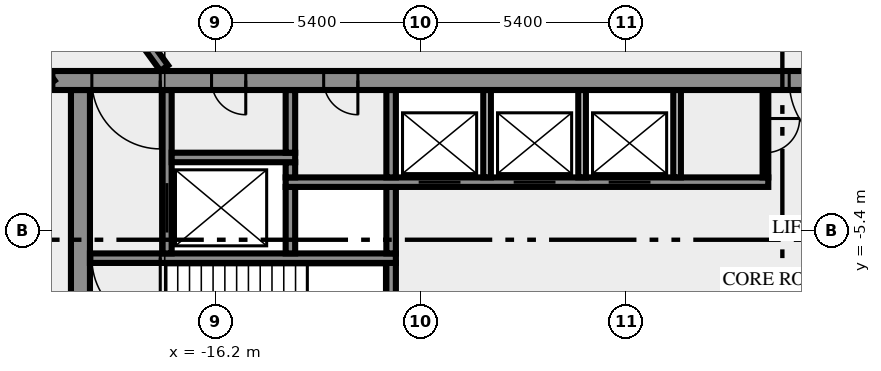
"""IFC4 building model, lengths in metres.
Left out: names, types, materials, properties, quantities, classifications, styles, units other than length and angle.
Written with IfcOpenShell. Run it as: python <this file> out.ifc"""

import sys

from ifc_helpers import new_model, si_unit, direction, frame, frame_2d, origin, place, context, subcontext, project, spatial, rectangle, extrude, element, fill, save


model = new_model("IFC4")
c1 = context("Model", 3, precision=1e-05, world=origin(), true_north=direction((0.0, 1.0)))
c2 = subcontext(c1, "Body", "Model", "MODEL_VIEW")
j1 = project(units=[si_unit("LENGTHUNIT", "METRE"), si_unit("PLANEANGLEUNIT", "RADIAN")], contexts=[c1])
p1 = place(None, origin())
s1 = spatial("IfcSite", under=j1, at=p1, CompositionType="ELEMENT")
p2 = place(p1, origin())
s2 = spatial("IfcBuilding", under=s1, at=p2, CompositionType="ELEMENT")
p3 = place(p2, frame((0.0, 0.0, 59.0)))
s3 = spatial("IfcBuildingStorey", under=s2, at=p3, CompositionType="ELEMENT", Elevation=59.0)
p4 = place(p3, frame((-19.75, -10.5, 0.0), z_axis=(0.0, 0.0, 1.0), x_axis=(0.0, 1.0, 0.0)))
e1 = element("IfcWall", 1, at=p4, inside=s3, PredefinedType="SHEAR", context=c2, shape_type="SweptSolid", body=[
    extrude(rectangle(XDim=8.8, YDim=0.5, at=frame_2d((4.4, 0.0))), origin(), (0.0, 0.0, 1.0), 3.65),
])
p5 = place(p3, frame((-11.575, -7.25, 0.0), z_axis=(0.0, 0.0, 1.0), x_axis=(0.0, 1.0, 0.0)))
e2 = element("IfcWall", 2, at=p5, inside=s3, PredefinedType="SHEAR", context=c2, shape_type="SweptSolid", body=[
    extrude(rectangle(XDim=1.0, YDim=0.25, at=frame_2d((0.5, 0.0))), origin(), (0.0, 0.0, 1.0), 3.65),
])
p6 = place(p3, frame((-11.45, -6.125, 0.0), z_axis=(0.0, 0.0, 1.0), x_axis=(-1.0, 0.0, 0.0)))
e3 = element("IfcWall", 3, at=p6, inside=s3, PredefinedType="SHEAR", context=c2, shape_type="SweptSolid", body=[
    extrude(rectangle(XDim=8.05, YDim=0.25, at=frame_2d((4.025, 0.0))), origin(), (0.0, 0.0, 1.0), 3.65),
])
p7 = place(p6, frame((6.2, 0.0, 0.0)))
e4 = element("IfcOpeningElement", 4, at=p7, cuts=e3, PredefinedType="OPENING", context=c2, shape_type="SweptSolid", body=[
    extrude(rectangle(XDim=1.8, YDim=2.1, at=frame_2d((0.9, 1.05))), frame((0.0, 0.135, 0.0), z_axis=(0.0, -1.0, 0.0), x_axis=(1.0, 0.0, 0.0)), (0.0, 0.0, 1.0), 0.27),
])
p8 = place(p3, frame((-17.475, -6.0, 0.0), z_axis=(0.0, 0.0, 1.0), x_axis=(0.0, 1.0, 0.0)))
e5 = element("IfcWall", 5, at=p8, inside=s3, PredefinedType="SHEAR", context=c2, shape_type="SweptSolid", body=[
    extrude(rectangle(XDim=4.3, YDim=0.25, at=frame_2d((2.15, 0.0))), origin(), (0.0, 0.0, 1.0), 3.65),
])
p9 = place(p8, frame((0.55, 0.0, 0.0)))
e6 = element("IfcOpeningElement", 6, at=p9, cuts=e5, PredefinedType="OPENING", context=c2, shape_type="SweptSolid", body=[
    extrude(rectangle(XDim=1.3, YDim=2.1, at=frame_2d((0.65, 1.05))), frame((0.0, 0.135, 0.0), z_axis=(0.0, -1.0, 0.0), x_axis=(1.0, 0.0, 0.0)), (0.0, 0.0, 1.0), 0.27),
])
for number, where, z_axis, x_axis in (
    (7, (-14.225, -6.0, 0.0), (0.0, 0.0, 1.0), (0.0, 1.0, 0.0)),
    (8, (-11.575, -6.0, 0.0), (0.0, 0.0, 1.0), (0.0, 1.0, 0.0)),
):
    element("IfcWall", number, at=place(p3, frame(where, z_axis=z_axis, x_axis=x_axis)), inside=s3, PredefinedType="SHEAR", context=c2, shape_type="SweptSolid", body=[
        extrude(rectangle(XDim=1.75, YDim=0.25, at=frame_2d((0.875, 0.0))), origin(), (0.0, 0.0, 1.0), 3.65),
    ])
p10 = place(p3, frame((-14.35, -4.125, 0.0), z_axis=(0.0, 0.0, 1.0), x_axis=(1.0, 0.0, 0.0)))
e9 = element("IfcWall", 9, at=p10, inside=s3, PredefinedType="SHEAR", context=c2, shape_type="SweptSolid", body=[
    extrude(rectangle(XDim=12.7, YDim=0.25, at=frame_2d((6.35, 0.0))), origin(), (0.0, 0.0, 1.0), 3.65),
])
p11 = place(p10, frame((3.5, 0.0, 0.0)))
e10 = element("IfcOpeningElement", 10, at=p11, cuts=e9, PredefinedType="OPENING", context=c2, shape_type="SweptSolid", body=[
    extrude(rectangle(XDim=1.1, YDim=2.1, at=frame_2d((0.55, 1.05))), frame((0.0, 0.135, 0.0), z_axis=(0.0, -1.0, 0.0), x_axis=(1.0, 0.0, 0.0)), (0.0, 0.0, 1.0), 0.27),
])
p12 = place(p10, frame((6.0, 0.0, 0.0)))
e11 = element("IfcOpeningElement", 11, at=p12, cuts=e9, PredefinedType="OPENING", context=c2, shape_type="SweptSolid", body=[
    extrude(rectangle(XDim=1.1, YDim=2.1, at=frame_2d((0.55, 1.05))), frame((0.0, 0.135, 0.0), z_axis=(0.0, -1.0, 0.0), x_axis=(1.0, 0.0, 0.0)), (0.0, 0.0, 1.0), 0.27),
])
p13 = place(p10, frame((8.5, 0.0, 0.0)))
e12 = element("IfcOpeningElement", 12, at=p13, cuts=e9, PredefinedType="OPENING", context=c2, shape_type="SweptSolid", body=[
    extrude(rectangle(XDim=1.1, YDim=2.1, at=frame_2d((0.55, 1.05))), frame((0.0, 0.135, 0.0), z_axis=(0.0, -1.0, 0.0), x_axis=(1.0, 0.0, 0.0)), (0.0, 0.0, 1.0), 0.27),
])
p14 = place(p3, frame((-14.225, -4.0, 0.0), z_axis=(0.0, 0.0, 1.0), x_axis=(0.0, 1.0, 0.0)))
e13 = element("IfcWall", 13, at=p14, inside=s3, PredefinedType="SHEAR", context=c2, shape_type="SweptSolid", body=[
    extrude(rectangle(XDim=0.4, YDim=0.25, at=frame_2d((0.2, 0.0))), origin(), (0.0, 0.0, 1.0), 3.65),
])
p15 = place(p3, frame((-11.575, -4.0, 0.0), z_axis=(0.0, 0.0, 1.0), x_axis=(0.0, 1.0, 0.0)))
e14 = element("IfcWall", 14, at=p15, inside=s3, PredefinedType="SHEAR", context=c2, shape_type="SweptSolid", body=[
    extrude(rectangle(XDim=2.3, YDim=0.25, at=frame_2d((1.15, 0.0))), origin(), (0.0, 0.0, 1.0), 3.65),
])
for number, where, z_axis, x_axis in (
    (15, (-9.05, -4.0, 0.0), (0.0, 0.0, 1.0), (0.0, 1.0, 0.0)),
    (16, (-6.55, -4.0, 0.0), (0.0, 0.0, 1.0), (0.0, 1.0, 0.0)),
    (17, (-4.05, -4.0, 0.0), (0.0, 0.0, 1.0), (0.0, 1.0, 0.0)),
):
    element("IfcWall", number, at=place(p3, frame(where, z_axis=z_axis, x_axis=x_axis)), inside=s3, PredefinedType="SOLIDWALL", context=c2, shape_type="SweptSolid", body=[
        extrude(rectangle(XDim=2.3, YDim=0.2, at=frame_2d((1.15, 0.0))), origin(), (0.0, 0.0, 1.0), 3.65),
    ])
p16 = place(p3, frame((-1.725, -1.7, 0.0), z_axis=(0.0, 0.0, 1.0), x_axis=(0.0, -1.0, 0.0)))
e18 = element("IfcWall", 18, at=p16, inside=s3, PredefinedType="PARTITIONING", context=c2, shape_type="SweptSolid", body=[
    extrude(rectangle(XDim=2.3, YDim=0.15, at=frame_2d((1.15, 0.0))), origin(), (0.0, 0.0, 1.0), 3.65),
])
p17 = place(p16, frame((0.75, 0.0, 0.0)))
e19 = element("IfcOpeningElement", 19, at=p17, cuts=e18, PredefinedType="OPENING", context=c2, shape_type="SweptSolid", body=[
    extrude(rectangle(XDim=0.9, YDim=2.1, at=frame_2d((0.45, 1.05))), frame((0.0, 0.085, 0.0), z_axis=(0.0, -1.0, 0.0), x_axis=(1.0, 0.0, 0.0)), (0.0, 0.0, 1.0), 0.17),
])
p18 = place(p3, frame((-17.35, -3.475, 0.0), z_axis=(0.0, 0.0, 1.0), x_axis=(1.0, 0.0, 0.0)))
e20 = element("IfcWall", 20, at=p18, inside=s3, PredefinedType="SHEAR", context=c2, shape_type="SweptSolid", body=[
    extrude(rectangle(XDim=3.25, YDim=0.25, at=frame_2d((1.625, 0.0))), origin(), (0.0, 0.0, 1.0), 3.65),
])
p19 = place(p3, frame((-14.225, -3.35, 0.0), z_axis=(0.0, 0.0, 1.0), x_axis=(0.0, 1.0, 0.0)))
e21 = element("IfcWall", 21, at=p19, inside=s3, PredefinedType="SHEAR", context=c2, shape_type="SweptSolid", body=[
    extrude(rectangle(XDim=1.65, YDim=0.25, at=frame_2d((0.825, 0.0))), origin(), (0.0, 0.0, 1.0), 3.65),
])
p20 = place(p3, frame((20.49, -1.45, 0.0), z_axis=(0.0, 0.0, 1.0), x_axis=(-1.0, 0.0, 0.0)))
e22 = element("IfcWall", 22, at=p20, inside=s3, PredefinedType="SHEAR", context=c2, shape_type="SweptSolid", body=[
    extrude(rectangle(XDim=40.98, YDim=0.5, at=frame_2d((20.49, 0.0))), origin(), (0.0, 0.0, 1.0), 3.65),
])
p21 = place(p20, frame((38.14, 0.0, 0.0)))
e23 = element("IfcOpeningElement", 23, at=p21, cuts=e22, PredefinedType="OPENING", context=c2, shape_type="SweptSolid", body=[
    extrude(rectangle(XDim=1.8, YDim=2.1, at=frame_2d((0.9, 1.05))), frame((0.0, 0.26, 0.0), z_axis=(0.0, -1.0, 0.0), x_axis=(1.0, 0.0, 0.0)), (0.0, 0.0, 1.0), 0.52),
])
p22 = place(p20, frame((35.89, 0.0, 0.0)))
e24 = element("IfcOpeningElement", 24, at=p22, cuts=e22, PredefinedType="OPENING", context=c2, shape_type="SweptSolid", body=[
    extrude(rectangle(XDim=0.9, YDim=2.1, at=frame_2d((0.45, 1.05))), frame((0.0, 0.26, 0.0), z_axis=(0.0, -1.0, 0.0), x_axis=(1.0, 0.0, 0.0)), (0.0, 0.0, 1.0), 0.52),
])
p23 = place(p20, frame((32.94, 0.0, 0.0)))
e25 = element("IfcOpeningElement", 25, at=p23, cuts=e22, PredefinedType="OPENING", context=c2, shape_type="SweptSolid", body=[
    extrude(rectangle(XDim=0.9, YDim=2.1, at=frame_2d((0.45, 1.05))), frame((0.0, 0.26, 0.0), z_axis=(0.0, -1.0, 0.0), x_axis=(1.0, 0.0, 0.0)), (0.0, 0.0, 1.0), 0.52),
])
p24 = place(p20, frame((19.59, 0.0, 0.0)))
e26 = element("IfcOpeningElement", 26, at=p24, cuts=e22, PredefinedType="OPENING", context=c2, shape_type="SweptSolid", body=[
    extrude(rectangle(XDim=2.0, YDim=2.1, at=frame_2d((1.0, 1.05))), frame((0.0, 0.26, 0.0), z_axis=(0.0, -1.0, 0.0), x_axis=(1.0, 0.0, 0.0)), (0.0, 0.0, 1.0), 0.52),
])
p25 = place(p20, frame((7.14, 0.0, 0.0)))
e27 = element("IfcOpeningElement", 27, at=p25, cuts=e22, PredefinedType="OPENING", context=c2, shape_type="SweptSolid", body=[
    extrude(rectangle(XDim=0.9, YDim=2.1, at=frame_2d((0.45, 1.05))), frame((0.0, 0.26, 0.0), z_axis=(0.0, -1.0, 0.0), x_axis=(1.0, 0.0, 0.0)), (0.0, 0.0, 1.0), 0.52),
])
p26 = place(p20, frame((5.028, 0.0, 0.0)))
e28 = element("IfcOpeningElement", 28, at=p26, cuts=e22, PredefinedType="OPENING", context=c2, shape_type="SweptSolid", body=[
    extrude(rectangle(XDim=0.8, YDim=2.1, at=frame_2d((0.4, 1.05))), frame((0.0, 0.26, 0.0), z_axis=(0.0, -1.0, 0.0), x_axis=(1.0, 0.0, 0.0)), (0.0, 0.0, 1.0), 0.52),
])
p27 = place(p20, frame((3.452, 0.0, 0.0)))
e29 = element("IfcOpeningElement", 29, at=p27, cuts=e22, PredefinedType="OPENING", context=c2, shape_type="SweptSolid", body=[
    extrude(rectangle(XDim=0.8, YDim=2.1, at=frame_2d((0.4, 1.05))), frame((0.0, 0.26, 0.0), z_axis=(0.0, -1.0, 0.0), x_axis=(1.0, 0.0, 0.0)), (0.0, 0.0, 1.0), 0.52),
])
p28 = place(p20, frame((1.04, 0.0, 0.0)))
e30 = element("IfcOpeningElement", 30, at=p28, cuts=e22, PredefinedType="OPENING", context=c2, shape_type="SweptSolid", body=[
    extrude(rectangle(XDim=1.8, YDim=2.1, at=frame_2d((0.9, 1.05))), frame((0.0, 0.26, 0.0), z_axis=(0.0, -1.0, 0.0), x_axis=(1.0, 0.0, 0.0)), (0.0, 0.0, 1.0), 0.52),
])
p29 = place(p3, frame((-20.531, -1.523, 0.0), z_axis=(0.0, 0.0, 1.0), x_axis=(-0.587784593204, 0.809017473231, 0.0)))
e31 = element("IfcWall", 31, at=p29, inside=s3, PredefinedType="SOLIDWALL", context=c2, shape_type="SweptSolid", body=[
    extrude(rectangle(XDim=44.67, YDim=0.25, at=frame_2d((22.335, 0.0))), origin(), (0.0, 0.0, 1.0), 3.65),
])
p30 = place(p29, frame((43.046, 0.0, 0.0)))
e32 = element("IfcOpeningElement", 32, at=p30, cuts=e31, PredefinedType="OPENING", context=c2, shape_type="SweptSolid", body=[
    extrude(rectangle(XDim=1.2, YDim=2.1, at=frame_2d((0.6, 1.05))), frame((0.0, 0.135, 0.0), z_axis=(0.0, -1.0, 0.0), x_axis=(1.0, 0.0, 0.0)), (0.0, 0.0, 1.0), 0.27),
])
p31 = place(p29, frame((21.266, 0.0, 0.0)))
e33 = element("IfcOpeningElement", 33, at=p31, cuts=e31, PredefinedType="OPENING", context=c2, shape_type="SweptSolid", body=[
    extrude(rectangle(XDim=1.2, YDim=2.1, at=frame_2d((0.6, 1.05))), frame((0.0, 0.135, 0.0), z_axis=(0.0, -1.0, 0.0), x_axis=(1.0, 0.0, 0.0)), (0.0, 0.0, 1.0), 0.27),
])
p32 = place(p29, frame((17.015, 0.0, 0.0)))
e34 = element("IfcOpeningElement", 34, at=p32, cuts=e31, PredefinedType="OPENING", context=c2, shape_type="SweptSolid", body=[
    extrude(rectangle(XDim=0.9, YDim=2.1, at=frame_2d((0.45, 1.05))), frame((0.0, 0.135, 0.0), z_axis=(0.0, -1.0, 0.0), x_axis=(1.0, 0.0, 0.0)), (0.0, 0.0, 1.0), 0.27),
])
p33 = place(p29, frame((0.533, 0.0, 0.0)))
e35 = element("IfcOpeningElement", 35, at=p33, cuts=e31, PredefinedType="OPENING", context=c2, shape_type="SweptSolid", body=[
    extrude(rectangle(XDim=0.9, YDim=2.1, at=frame_2d((0.45, 1.05))), frame((0.0, 0.135, 0.0), z_axis=(0.0, -1.0, 0.0), x_axis=(1.0, 0.0, 0.0)), (0.0, 0.0, 1.0), 0.27),
])
p34 = place(p29, frame((18.616, 0.0, 0.0)))
e36 = element("IfcOpeningElement", 36, at=p34, cuts=e31, PredefinedType="OPENING", context=c2, shape_type="SweptSolid", body=[
    extrude(rectangle(XDim=0.9, YDim=2.1, at=frame_2d((0.45, 1.05))), frame((0.0, 0.135, 0.0), z_axis=(0.0, -1.0, 0.0), x_axis=(1.0, 0.0, 0.0)), (0.0, 0.0, 1.0), 0.27),
])
p35 = place(p29, frame((7.816, 0.0, 0.0)))
e37 = element("IfcOpeningElement", 37, at=p35, cuts=e31, PredefinedType="OPENING", context=c2, shape_type="SweptSolid", body=[
    extrude(rectangle(XDim=0.9, YDim=2.1, at=frame_2d((0.45, 1.05))), frame((0.0, 0.135, 0.0), z_axis=(0.0, -1.0, 0.0), x_axis=(1.0, 0.0, 0.0)), (0.0, 0.0, 1.0), 0.27),
])
p36 = place(p3, frame((-37.232, 25.972, 0.0), z_axis=(0.0, 0.0, 1.0), x_axis=(0.587786323093, -0.809016216391, 0.0)))
e38 = element("IfcWall", 38, at=p36, inside=s3, PredefinedType="SOLIDWALL", context=c2, shape_type="SweptSolid", body=[
    extrude(rectangle(XDim=33.493, YDim=0.25, at=frame_2d((16.747, 0.0))), origin(), (0.0, 0.0, 1.0), 3.65),
])
p37 = place(p36, frame((28.301, 0.0, 0.0)))
e39 = element("IfcOpeningElement", 39, at=p37, cuts=e38, PredefinedType="OPENING", context=c2, shape_type="SweptSolid", body=[
    extrude(rectangle(XDim=1.8, YDim=2.1, at=frame_2d((0.9, 1.05))), frame((0.0, 0.135, 0.0), z_axis=(0.0, -1.0, 0.0), x_axis=(1.0, 0.0, 0.0)), (0.0, 0.0, 1.0), 0.27),
])
p38 = place(p36, frame((4.235, 0.0, 0.0)))
e40 = element("IfcOpeningElement", 40, at=p38, cuts=e38, PredefinedType="OPENING", context=c2, shape_type="SweptSolid", body=[
    extrude(rectangle(XDim=1.8, YDim=2.1, at=frame_2d((0.9, 1.05))), frame((0.0, 0.135, 0.0), z_axis=(0.0, -1.0, 0.0), x_axis=(1.0, 0.0, 0.0)), (0.0, 0.0, 1.0), 0.27),
])
p39 = place(p36, frame((2.685, 0.0, 0.0)))
e41 = element("IfcOpeningElement", 41, at=p39, cuts=e38, PredefinedType="OPENING", context=c2, shape_type="SweptSolid", body=[
    extrude(rectangle(XDim=0.9, YDim=2.1, at=frame_2d((0.45, 1.05))), frame((0.0, 0.135, 0.0), z_axis=(0.0, -1.0, 0.0), x_axis=(1.0, 0.0, 0.0)), (0.0, 0.0, 1.0), 0.27),
])
p40 = place(p7, origin())
e42 = element("IfcDoor", 42, at=p40, inside=s3, OperationType="DOUBLE_DOOR_SINGLE_SWING", PredefinedType="DOOR", context=c2, shape_type="SweptSolid", body=[
    extrude(rectangle(XDim=1.8, YDim=2.1, at=frame_2d((0.9, 1.05))), frame((0.0, 0.025, 0.0), z_axis=(0.0, -1.0, 0.0), x_axis=(1.0, 0.0, 0.0)), (0.0, 0.0, 1.0), 0.05),
])
fill(e4, e42)
p41 = place(p9, origin())
e43 = element("IfcDoor", 43, at=p41, inside=s3, OperationType="DOUBLE_DOOR_SLIDING", PredefinedType="DOOR", context=c2, shape_type="SweptSolid", body=[
    extrude(rectangle(XDim=1.3, YDim=2.1, at=frame_2d((0.65, 1.05))), frame((0.0, 0.025, 0.0), z_axis=(0.0, -1.0, 0.0), x_axis=(1.0, 0.0, 0.0)), (0.0, 0.0, 1.0), 0.05),
])
fill(e6, e43)
p42 = place(p11, origin())
e44 = element("IfcDoor", 44, at=p42, inside=s3, OperationType="DOUBLE_DOOR_SLIDING", PredefinedType="DOOR", context=c2, shape_type="SweptSolid", body=[
    extrude(rectangle(XDim=1.1, YDim=2.1, at=frame_2d((0.55, 1.05))), frame((0.0, 0.025, 0.0), z_axis=(0.0, -1.0, 0.0), x_axis=(1.0, 0.0, 0.0)), (0.0, 0.0, 1.0), 0.05),
])
fill(e10, e44)
p43 = place(p12, origin())
e45 = element("IfcDoor", 45, at=p43, inside=s3, OperationType="DOUBLE_DOOR_SLIDING", PredefinedType="DOOR", context=c2, shape_type="SweptSolid", body=[
    extrude(rectangle(XDim=1.1, YDim=2.1, at=frame_2d((0.55, 1.05))), frame((0.0, 0.025, 0.0), z_axis=(0.0, -1.0, 0.0), x_axis=(1.0, 0.0, 0.0)), (0.0, 0.0, 1.0), 0.05),
])
fill(e11, e45)
p44 = place(p13, origin())
e46 = element("IfcDoor", 46, at=p44, inside=s3, OperationType="DOUBLE_DOOR_SLIDING", PredefinedType="DOOR", context=c2, shape_type="SweptSolid", body=[
    extrude(rectangle(XDim=1.1, YDim=2.1, at=frame_2d((0.55, 1.05))), frame((0.0, 0.025, 0.0), z_axis=(0.0, -1.0, 0.0), x_axis=(1.0, 0.0, 0.0)), (0.0, 0.0, 1.0), 0.05),
])
fill(e12, e46)
p45 = place(p17, origin())
e47 = element("IfcDoor", 47, at=p45, inside=s3, OperationType="SINGLE_SWING_RIGHT", PredefinedType="DOOR", context=c2, shape_type="SweptSolid", body=[
    extrude(rectangle(XDim=0.9, YDim=2.1, at=frame_2d((0.45, 1.05))), frame((0.0, 0.025, 0.0), z_axis=(0.0, -1.0, 0.0), x_axis=(1.0, 0.0, 0.0)), (0.0, 0.0, 1.0), 0.05),
])
fill(e19, e47)
p46 = place(p21, origin())
e48 = element("IfcDoor", 48, at=p46, inside=s3, OperationType="DOUBLE_DOOR_SINGLE_SWING", PredefinedType="DOOR", context=c2, shape_type="SweptSolid", body=[
    extrude(rectangle(XDim=1.8, YDim=2.1, at=frame_2d((0.9, 1.05))), frame((0.0, 0.025, 0.0), z_axis=(0.0, -1.0, 0.0), x_axis=(1.0, 0.0, 0.0)), (0.0, 0.0, 1.0), 0.05),
])
fill(e23, e48)
p47 = place(p22, origin())
e49 = element("IfcDoor", 49, at=p47, inside=s3, OperationType="SINGLE_SWING_RIGHT", PredefinedType="DOOR", context=c2, shape_type="SweptSolid", body=[
    extrude(rectangle(XDim=0.9, YDim=2.1, at=frame_2d((0.45, 1.05))), frame((0.0, 0.025, 0.0), z_axis=(0.0, -1.0, 0.0), x_axis=(1.0, 0.0, 0.0)), (0.0, 0.0, 1.0), 0.05),
])
fill(e24, e49)
p48 = place(p23, origin())
e50 = element("IfcDoor", 50, at=p48, inside=s3, OperationType="SINGLE_SWING_RIGHT", PredefinedType="DOOR", context=c2, shape_type="SweptSolid", body=[
    extrude(rectangle(XDim=0.9, YDim=2.1, at=frame_2d((0.45, 1.05))), frame((0.0, 0.025, 0.0), z_axis=(0.0, -1.0, 0.0), x_axis=(1.0, 0.0, 0.0)), (0.0, 0.0, 1.0), 0.05),
])
fill(e25, e50)
p49 = place(p24, origin())
e51 = element("IfcDoor", 51, at=p49, inside=s3, OperationType="DOUBLE_DOOR_SINGLE_SWING", PredefinedType="DOOR", context=c2, shape_type="SweptSolid", body=[
    extrude(rectangle(XDim=2.0, YDim=2.1, at=frame_2d((1.0, 1.05))), frame((0.0, 0.025, 0.0), z_axis=(0.0, -1.0, 0.0), x_axis=(1.0, 0.0, 0.0)), (0.0, 0.0, 1.0), 0.05),
])
fill(e26, e51)
save(model, sys.argv[1])
